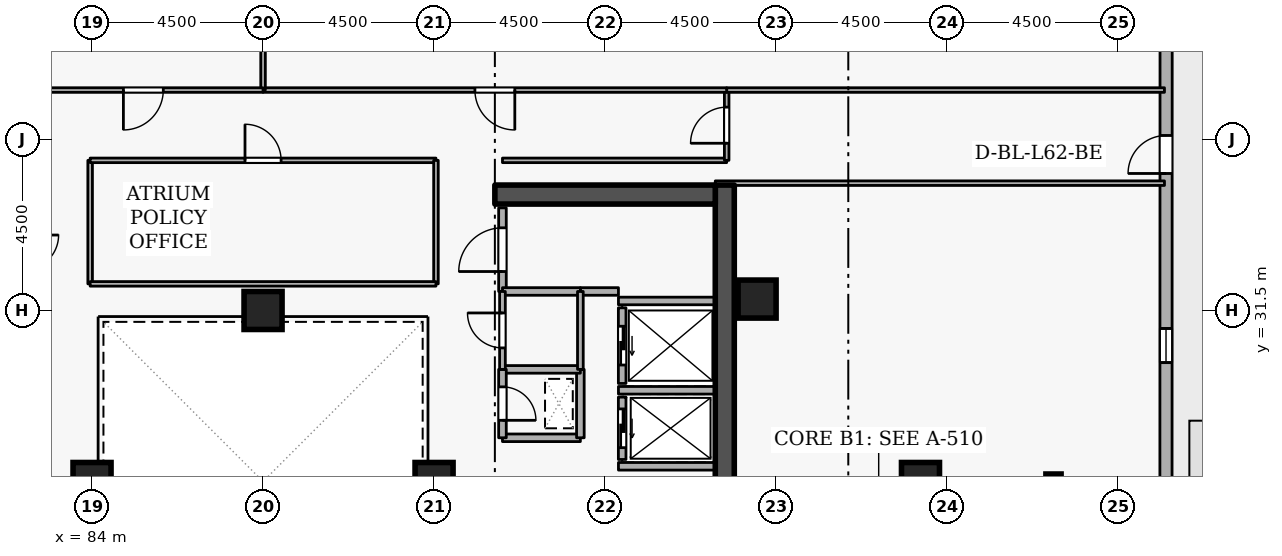
"""IFC4 building model, lengths in metres.
Left out: names, types, materials, properties, quantities, classifications, styles, units other than length and angle.
Written with IfcOpenShell. Run it as: python <this file> out.ifc"""

import sys

from ifc_helpers import new_model, si_unit, direction, frame, frame_2d, origin, origin_2d, place, context, subcontext, project, spatial, rectangle, i_section, extrude, element, fill, save


model = new_model("IFC4")
c1 = context("Model", 3, precision=1e-05, world=origin(), true_north=direction((0.0, 1.0)))
c2 = subcontext(c1, "Body", "Model", "MODEL_VIEW")
j1 = project(units=[si_unit("LENGTHUNIT", "METRE"), si_unit("PLANEANGLEUNIT", "RADIAN")], contexts=[c1])
p1 = place(None, origin())
s1 = spatial("IfcSite", under=j1, at=p1, CompositionType="ELEMENT")
p2 = place(p1, origin())
s2 = spatial("IfcBuilding", under=s1, at=p2, CompositionType="ELEMENT")
p3 = place(p2, frame((0.0, 0.0, 233.1)))
s3 = spatial("IfcBuildingStorey", under=s2, at=p3, CompositionType="ELEMENT", Elevation=233.1)
p4 = place(p3, frame((100.65, 19.2, 0.0), z_axis=(0.0, 0.0, 1.0), x_axis=(0.0, 1.0, 0.0)))
e1 = element("IfcWall", 1, at=p4, inside=s3, PredefinedType="SHEAR", context=c2, shape_type="SweptSolid", body=[
    extrude(rectangle(XDim=15.6, YDim=0.5, at=frame_2d((7.8, 0.0))), origin(), (0.0, 0.0, 1.0), 3.6),
])
p5 = place(p3, frame((94.6, 34.55, 0.0), z_axis=(0.0, 0.0, 1.0), x_axis=(1.0, 0.0, 0.0)))
e2 = element("IfcWall", 2, at=p5, inside=s3, PredefinedType="SHEAR", context=c2, shape_type="SweptSolid", body=[
    extrude(rectangle(XDim=5.8, YDim=0.5, at=frame_2d((2.9, 0.0))), origin(), (0.0, 0.0, 1.0), 3.6),
])
for number, where, z_axis, x_axis in (
    (3, (105.8, 27.0, 0.0), (0.0, 0.0, 1.0), (1.0, 0.0, 0.0)),
    (4, (101.5, 31.8, 0.0), (0.0, 0.0, 1.0), (1.0, 0.0, 0.0)),
    (5, (93.0, 27.0, 0.0), (0.0, 0.0, 1.0), (1.0, 0.0, 0.0)),
    (6, (84.0, 27.0, 0.0), (0.0, 0.0, 1.0), (1.0, 0.0, 0.0)),
    (7, (88.5, 31.5, 0.0), (0.0, 0.0, 1.0), (1.0, 0.0, 0.0)),
):
    element("IfcColumn", number, at=place(p3, frame(where, z_axis=z_axis, x_axis=x_axis)), inside=s3, PredefinedType="COLUMN", context=c2, shape_type="SweptSolid", body=[
        extrude(rectangle(XDim=1.0, YDim=1.0, at=origin_2d()), origin(), (0.0, 0.0, 1.0), 3.6),
    ])
p6 = place(p3, frame((109.3, 27.0, 0.0), z_axis=(0.0, 0.0, 1.0), x_axis=(1.0, 0.0, 0.0)))
e8 = element("IfcColumn", 8, at=p6, inside=s3, PredefinedType="COLUMN", context=c2, shape_type="SweptSolid", body=[
    extrude(i_section(OverallWidth=0.399, OverallDepth=0.394, WebThickness=0.023, FlangeThickness=0.037, FilletRadius=0.015, at=origin_2d()), origin(), (0.0, 0.0, 1.0), 3.6),
])
p7 = place(p3, frame((112.254, 9.128, 0.0), z_axis=(0.0, 0.0, 1.0), x_axis=(0.000332378036, 0.999999944762, 0.0)))
e9 = element("IfcWall", 9, at=p7, inside=s3, PredefinedType="STANDARD", context=c2, shape_type="SweptSolid", body=[
    extrude(rectangle(XDim=33.054, YDim=0.32, at=frame_2d((16.527, 0.0))), origin(), (0.0, 0.0, 1.0), 2.7),
])
p8 = place(p7, frame((25.977, 0.0, 0.0)))
e10 = element("IfcOpeningElement", 10, at=p8, cuts=e9, PredefinedType="OPENING", context=c2, shape_type="SweptSolid", body=[
    extrude(rectangle(XDim=1.0, YDim=2.08, at=frame_2d((0.5, 1.04))), frame((0.0, 0.17, 0.0), z_axis=(0.0, -1.0, 0.0), x_axis=(1.0, 0.0, 0.0)), (0.0, 0.0, 1.0), 0.34),
])
p9 = place(p7, frame((1.8, 0.0, 0.72)))
e11 = element("IfcOpeningElement", 11, at=p9, cuts=e9, PredefinedType="OPENING", context=c2, shape_type="SweptSolid", body=[
    extrude(rectangle(XDim=0.9, YDim=1.75, at=frame_2d((0.45, 0.875))), frame((0.0, 0.17, 0.0), z_axis=(0.0, -1.0, 0.0), x_axis=(1.0, 0.0, 0.0)), (0.0, 0.0, 1.0), 0.34),
])
p10 = place(p7, frame((11.4, 0.0, 0.72)))
e12 = element("IfcOpeningElement", 12, at=p10, cuts=e9, PredefinedType="OPENING", context=c2, shape_type="SweptSolid", body=[
    extrude(rectangle(XDim=0.9, YDim=1.75, at=frame_2d((0.45, 0.875))), frame((0.0, 0.17, 0.0), z_axis=(0.0, -1.0, 0.0), x_axis=(1.0, 0.0, 0.0)), (0.0, 0.0, 1.0), 0.34),
])
p11 = place(p7, frame((16.2, 0.0, 0.72)))
e13 = element("IfcOpeningElement", 13, at=p11, cuts=e9, PredefinedType="OPENING", context=c2, shape_type="SweptSolid", body=[
    extrude(rectangle(XDim=0.9, YDim=1.75, at=frame_2d((0.45, 0.875))), frame((0.0, 0.17, 0.0), z_axis=(0.0, -1.0, 0.0), x_axis=(1.0, 0.0, 0.0)), (0.0, 0.0, 1.0), 0.34),
])
p12 = place(p7, frame((21.0, 0.0, 0.72)))
e14 = element("IfcOpeningElement", 14, at=p12, cuts=e9, PredefinedType="OPENING", context=c2, shape_type="SweptSolid", body=[
    extrude(rectangle(XDim=0.9, YDim=1.75, at=frame_2d((0.45, 0.875))), frame((0.0, 0.17, 0.0), z_axis=(0.0, -1.0, 0.0), x_axis=(1.0, 0.0, 0.0)), (0.0, 0.0, 1.0), 0.34),
])
p13 = place(p3, frame((97.95, 29.22, 0.0), z_axis=(0.0, 0.0, 1.0), x_axis=(0.0, -1.0, 0.0)))
e15 = element("IfcWall", 15, at=p13, inside=s3, PredefinedType="STANDARD", context=c2, shape_type="SweptSolid", body=[
    extrude(rectangle(XDim=1.64, YDim=0.2, at=frame_2d((0.82, 0.0))), origin(), (0.0, 0.0, 1.0), 3.34),
])
p14 = place(p13, frame((0.31, 0.0, 0.0)))
e16 = element("IfcOpeningElement", 16, at=p14, cuts=e15, PredefinedType="OPENING", context=c2, shape_type="SweptSolid", body=[
    extrude(rectangle(XDim=1.02, YDim=2.06, at=frame_2d((0.51, 1.03))), frame((0.0, 0.11, 0.0), z_axis=(0.0, -1.0, 0.0), x_axis=(1.0, 0.0, 0.0)), (0.0, 0.0, 1.0), 0.22),
])
p15 = place(p3, frame((97.95, 31.57, 0.0), z_axis=(0.0, 0.0, 1.0), x_axis=(0.0, -1.0, 0.0)))
e17 = element("IfcWall", 17, at=p15, inside=s3, PredefinedType="STANDARD", context=c2, shape_type="SweptSolid", body=[
    extrude(rectangle(XDim=1.99, YDim=0.2, at=frame_2d((0.995, 0.0))), origin(), (0.0, 0.0, 1.0), 3.34),
])
p16 = place(p15, frame((0.485, 0.0, 0.0)))
e18 = element("IfcOpeningElement", 18, at=p16, cuts=e17, PredefinedType="OPENING", context=c2, shape_type="SweptSolid", body=[
    extrude(rectangle(XDim=1.02, YDim=2.06, at=frame_2d((0.51, 1.03))), frame((0.0, 0.11, 0.0), z_axis=(0.0, -1.0, 0.0), x_axis=(1.0, 0.0, 0.0)), (0.0, 0.0, 1.0), 0.22),
])
for number, where, z_axis, x_axis in (
    (19, (97.852, 29.4, 0.0), (0.0, 0.0, 1.0), (1.0, 0.0, 0.0)),
    (20, (97.852, 27.4, 0.0), (0.0, 0.0, 1.0), (1.0, 0.0, 0.0)),
    (21, (97.852, 31.75, 0.0), (0.0, 0.0, 1.0), (1.0, 0.0, 0.0)),
):
    element("IfcWall", number, at=place(p3, frame(where, z_axis=z_axis, x_axis=x_axis)), inside=s3, PredefinedType="STANDARD", context=c2, shape_type="SweptSolid", body=[
        extrude(rectangle(XDim=2.536, YDim=0.2, at=frame_2d((1.268, 0.0))), origin(), (0.0, 0.0, 1.0), 3.34),
    ])
p17 = place(p3, frame((94.8, 28.15, 0.0), z_axis=(0.0, 0.0, 1.0), x_axis=(1.0, 0.0, 0.0)))
e22 = element("IfcWall", 22, at=p17, inside=s3, PredefinedType="STANDARD", context=c2, shape_type="SweptSolid", body=[
    extrude(rectangle(XDim=2.05, YDim=0.2, at=frame_2d((1.025, 0.0))), origin(), (0.0, 0.0, 1.0), 3.34),
])
p18 = place(p3, frame((96.85, 28.15, 0.0), z_axis=(0.0, 0.0, 1.0), x_axis=(0.0, 1.0, 0.0)))
e23 = element("IfcWall", 23, at=p18, inside=s3, PredefinedType="STANDARD", context=c2, shape_type="SweptSolid", body=[
    extrude(rectangle(XDim=1.8, YDim=0.2, at=frame_2d((0.9, 0.0))), origin(), (0.0, 0.0, 1.0), 3.34),
])
p19 = place(p3, frame((96.85, 29.95, 0.0), z_axis=(0.0, 0.0, 1.0), x_axis=(-1.0, 0.0, 0.0)))
e24 = element("IfcWall", 24, at=p19, inside=s3, PredefinedType="STANDARD", context=c2, shape_type="SweptSolid", body=[
    extrude(rectangle(XDim=2.05, YDim=0.2, at=frame_2d((1.025, 0.0))), origin(), (0.0, 0.0, 1.0), 3.34),
])
p20 = place(p3, frame((94.8, 29.95, 0.0), z_axis=(0.0, 0.0, 1.0), x_axis=(0.0, -1.0, 0.0)))
e25 = element("IfcWall", 25, at=p20, inside=s3, PredefinedType="STANDARD", context=c2, shape_type="SweptSolid", body=[
    extrude(rectangle(XDim=1.8, YDim=0.2, at=frame_2d((0.9, 0.0))), origin(), (0.0, 0.0, 1.0), 3.34),
])
p21 = place(p20, frame((0.46, 0.0, 0.0)))
e26 = element("IfcOpeningElement", 26, at=p21, cuts=e25, PredefinedType="OPENING", context=c2, shape_type="SweptSolid", body=[
    extrude(rectangle(XDim=0.88, YDim=2.04, at=frame_2d((0.44, 1.02))), frame((0.0, 0.11, 0.0), z_axis=(0.0, -1.0, 0.0), x_axis=(1.0, 0.0, 0.0)), (0.0, 0.0, 1.0), 0.22),
])
p22 = place(p3, frame((94.8, 32.0, 0.0), z_axis=(0.0, 0.0, 1.0), x_axis=(0.0, 1.0, 0.0)))
e27 = element("IfcWall", 27, at=p22, inside=s3, PredefinedType="STANDARD", context=c2, shape_type="SweptSolid", body=[
    extrude(rectangle(XDim=2.2, YDim=0.2, at=frame_2d((1.1, 0.0))), origin(), (0.0, 0.0, 1.0), 3.34),
])
p23 = place(p22, frame((0.525, 0.0, 0.0)))
e28 = element("IfcOpeningElement", 28, at=p23, cuts=e27, PredefinedType="OPENING", context=c2, shape_type="SweptSolid", body=[
    extrude(rectangle(XDim=1.15, YDim=2.1, at=frame_2d((0.575, 1.05))), frame((0.0, 0.11, 0.0), z_axis=(0.0, -1.0, 0.0), x_axis=(1.0, 0.0, 0.0)), (0.0, 0.0, 1.0), 0.22),
])
p24 = place(p3, frame((97.852, 32.0, 0.0), z_axis=(0.0, 0.0, 1.0), x_axis=(-1.0, 0.0, 0.0)))
e29 = element("IfcWall", 29, at=p24, inside=s3, PredefinedType="STANDARD", context=c2, shape_type="SweptSolid", body=[
    extrude(rectangle(XDim=1.002, YDim=0.2, at=frame_2d((0.501, 0.0))), origin(), (0.0, 0.0, 1.0), 3.34),
])
p25 = place(p3, frame((96.85, 32.0, 0.0), z_axis=(0.0, 0.0, 1.0), x_axis=(-1.0, 0.0, 0.0)))
e30 = element("IfcWall", 30, at=p25, inside=s3, PredefinedType="STANDARD", context=c2, shape_type="SweptSolid", body=[
    extrude(rectangle(XDim=2.05, YDim=0.2, at=frame_2d((1.025, 0.0))), origin(), (0.0, 0.0, 1.0), 3.34),
])
p26 = place(p3, frame((94.8, 29.95, 0.0), z_axis=(0.0, 0.0, 1.0), x_axis=(0.0, 1.0, 0.0)))
e31 = element("IfcWall", 31, at=p26, inside=s3, PredefinedType="PARTITIONING", context=c2, shape_type="SweptSolid", body=[
    extrude(rectangle(XDim=2.05, YDim=0.15, at=frame_2d((1.025, 0.0))), origin(), (0.0, 0.0, 1.0), 3.34),
])
p27 = place(p26, frame((0.565, 0.0, 0.0)))
e32 = element("IfcOpeningElement", 32, at=p27, cuts=e31, PredefinedType="OPENING", context=c2, shape_type="SweptSolid", body=[
    extrude(rectangle(XDim=0.92, YDim=2.08, at=frame_2d((0.46, 1.04))), frame((0.0, 0.085, 0.0), z_axis=(0.0, -1.0, 0.0), x_axis=(1.0, 0.0, 0.0)), (0.0, 0.0, 1.0), 0.17),
])
p28 = place(p3, frame((96.85, 32.0, 0.0), z_axis=(0.0, 0.0, 1.0), x_axis=(0.0, -1.0, 0.0)))
e33 = element("IfcWall", 33, at=p28, inside=s3, PredefinedType="PARTITIONING", context=c2, shape_type="SweptSolid", body=[
    extrude(rectangle(XDim=2.05, YDim=0.15, at=frame_2d((1.025, 0.0))), origin(), (0.0, 0.0, 1.0), 3.34),
])
p29 = place(p3, frame((94.8, 35.45, 0.0), z_axis=(0.0, 0.0, 1.0), x_axis=(1.0, 0.0, 0.0)))
e34 = element("IfcWall", 34, at=p29, inside=s3, PredefinedType="PARTITIONING", context=c2, shape_type="SweptSolid", body=[
    extrude(rectangle(XDim=5.9, YDim=0.12, at=frame_2d((2.95, 0.0))), origin(), (0.0, 0.0, 1.0), 3.34),
])
p30 = place(p3, frame((100.7, 35.45, 0.0), z_axis=(0.0, 0.0, 1.0), x_axis=(0.0, 1.0, 0.0)))
e35 = element("IfcWall", 35, at=p30, inside=s3, PredefinedType="PARTITIONING", context=c2, shape_type="SweptSolid", body=[
    extrude(rectangle(XDim=1.85, YDim=0.12, at=frame_2d((0.925, 0.0))), origin(), (0.0, 0.0, 1.0), 3.34),
])
p31 = place(p30, frame((0.45, 0.0, 0.0)))
e36 = element("IfcOpeningElement", 36, at=p31, cuts=e35, PredefinedType="OPENING", context=c2, shape_type="SweptSolid", body=[
    extrude(rectangle(XDim=0.95, YDim=2.1, at=frame_2d((0.475, 1.05))), frame((0.0, 0.07, 0.0), z_axis=(0.0, -1.0, 0.0), x_axis=(1.0, 0.0, 0.0)), (0.0, 0.0, 1.0), 0.14),
])
p32 = place(p3, frame((100.7, 37.3, 0.0), z_axis=(0.0, 0.0, 1.0), x_axis=(1.0, 0.0, 0.0)))
e37 = element("IfcWall", 37, at=p32, inside=s3, PredefinedType="PARTITIONING", context=c2, shape_type="SweptSolid", body=[
    extrude(rectangle(XDim=11.52, YDim=0.12, at=frame_2d((5.76, 0.0))), origin(), (0.0, 0.0, 1.0), 3.34),
])
p33 = place(p3, frame((112.22, 34.85, 0.0), z_axis=(0.0, 0.0, 1.0), x_axis=(-1.0, 0.0, 0.0)))
e38 = element("IfcWall", 38, at=p33, inside=s3, PredefinedType="PARTITIONING", context=c2, shape_type="SweptSolid", body=[
    extrude(rectangle(XDim=11.82, YDim=0.12, at=frame_2d((5.91, 0.0))), origin(), (0.0, 0.0, 1.0), 2.545),
])
p34 = place(p3, frame((100.7, 37.3, 0.0), z_axis=(0.0, 0.0, 1.0), x_axis=(-1.0, 0.0, 0.0)))
e39 = element("IfcWall", 39, at=p34, inside=s3, PredefinedType="PARTITIONING", context=c2, shape_type="SweptSolid", body=[
    extrude(rectangle(XDim=12.2, YDim=0.12, at=frame_2d((6.1, 0.0))), origin(), (0.0, 0.0, 1.0), 3.34),
])
p35 = place(p34, frame((5.575, 0.0, 0.0)))
e40 = element("IfcOpeningElement", 40, at=p35, cuts=e39, PredefinedType="OPENING", context=c2, shape_type="SweptSolid", body=[
    extrude(rectangle(XDim=1.05, YDim=2.1, at=frame_2d((0.525, 1.05))), frame((0.0, 0.07, 0.0), z_axis=(0.0, -1.0, 0.0), x_axis=(1.0, 0.0, 0.0)), (0.0, 0.0, 1.0), 0.14),
])
p36 = place(p3, frame((88.5, 37.3, 0.0), z_axis=(0.0, 0.0, 1.0), x_axis=(0.0, 1.0, 0.0)))
e41 = element("IfcWall", 41, at=p36, inside=s3, PredefinedType="PARTITIONING", context=c2, shape_type="SweptSolid", body=[
    extrude(rectangle(XDim=7.42, YDim=0.12, at=frame_2d((3.71, 0.0))), origin(), (0.0, 0.0, 1.0), 2.932),
])
p37 = place(p3, frame((88.5, 37.3, 0.0), z_axis=(0.0, 0.0, 1.0), x_axis=(-1.0, 0.0, 0.0)))
e42 = element("IfcWall", 42, at=p37, inside=s3, PredefinedType="PARTITIONING", context=c2, shape_type="SweptSolid", body=[
    extrude(rectangle(XDim=6.3, YDim=0.12, at=frame_2d((3.15, 0.0))), origin(), (0.0, 0.0, 1.0), 3.34),
])
p38 = place(p37, frame((2.625, 0.0, 0.0)))
e43 = element("IfcOpeningElement", 43, at=p38, cuts=e42, PredefinedType="OPENING", context=c2, shape_type="SweptSolid", body=[
    extrude(rectangle(XDim=1.05, YDim=2.1, at=frame_2d((0.525, 1.05))), frame((0.0, 0.07, 0.0), z_axis=(0.0, -1.0, 0.0), x_axis=(1.0, 0.0, 0.0)), (0.0, 0.0, 1.0), 0.14),
])
p39 = place(p3, frame((83.95, 32.2, 0.0), z_axis=(0.0, 0.0, 1.0), x_axis=(0.0, 1.0, 0.0)))
e44 = element("IfcWall", 44, at=p39, inside=s3, PredefinedType="PARTITIONING", context=c2, shape_type="SweptSolid", body=[
    extrude(rectangle(XDim=3.25, YDim=0.12, at=frame_2d((1.625, 0.0))), origin(), (0.0, 0.0, 1.0), 3.34),
])
p40 = place(p3, frame((83.95, 35.45, 0.0), z_axis=(0.0, 0.0, 1.0), x_axis=(1.0, 0.0, 0.0)))
e45 = element("IfcWall", 45, at=p40, inside=s3, PredefinedType="PARTITIONING", context=c2, shape_type="SweptSolid", body=[
    extrude(rectangle(XDim=9.1, YDim=0.12, at=frame_2d((4.55, 0.0))), origin(), (0.0, 0.0, 1.0), 3.34),
])
p41 = place(p40, frame((4.075, 0.0, 0.0)))
e46 = element("IfcOpeningElement", 46, at=p41, cuts=e45, PredefinedType="OPENING", context=c2, shape_type="SweptSolid", body=[
    extrude(rectangle(XDim=0.95, YDim=2.1, at=frame_2d((0.475, 1.05))), frame((0.0, 0.07, 0.0), z_axis=(0.0, -1.0, 0.0), x_axis=(1.0, 0.0, 0.0)), (0.0, 0.0, 1.0), 0.14),
])
p42 = place(p3, frame((93.05, 35.45, 0.0), z_axis=(0.0, 0.0, 1.0), x_axis=(0.0, -1.0, 0.0)))
e47 = element("IfcWall", 47, at=p42, inside=s3, PredefinedType="PARTITIONING", context=c2, shape_type="SweptSolid", body=[
    extrude(rectangle(XDim=3.25, YDim=0.12, at=frame_2d((1.625, 0.0))), origin(), (0.0, 0.0, 1.0), 3.34),
])
p43 = place(p3, frame((93.05, 32.2, 0.0), z_axis=(0.0, 0.0, 1.0), x_axis=(-1.0, 0.0, 0.0)))
e48 = element("IfcWall", 48, at=p43, inside=s3, PredefinedType="PARTITIONING", context=c2, shape_type="SweptSolid", body=[
    extrude(rectangle(XDim=9.1, YDim=0.12, at=frame_2d((4.55, 0.0))), origin(), (0.0, 0.0, 1.0), 3.34),
])
p44 = place(p8, origin())
e49 = element("IfcDoor", 49, at=p44, inside=s3, OperationType="SINGLE_SWING_LEFT", PredefinedType="DOOR", context=c2, shape_type="SweptSolid", body=[
    extrude(rectangle(XDim=1.0, YDim=2.08, at=frame_2d((0.5, 1.04))), frame((0.0, 0.025, 0.0), z_axis=(0.0, -1.0, 0.0), x_axis=(1.0, 0.0, 0.0)), (0.0, 0.0, 1.0), 0.05),
])
fill(e10, e49)
p45 = place(p12, origin())
e50 = element("IfcWindow", 50, at=p45, inside=s3, PartitioningType="SINGLE_PANEL", PredefinedType="WINDOW", context=c2, shape_type="SweptSolid", body=[
    extrude(rectangle(XDim=0.9, YDim=1.75, at=frame_2d((0.45, 0.875))), frame((0.0, 0.03, 0.0), z_axis=(0.0, -1.0, 0.0), x_axis=(1.0, 0.0, 0.0)), (0.0, 0.0, 1.0), 0.06),
])
fill(e14, e50)
p46 = place(p14, origin())
e51 = element("IfcDoor", 51, at=p46, inside=s3, OperationType="SLIDING_TO_LEFT", PredefinedType="DOOR", context=c2, shape_type="SweptSolid", body=[
    extrude(rectangle(XDim=1.02, YDim=2.06, at=frame_2d((0.51, 1.03))), frame((0.0, 0.025, 0.0), z_axis=(0.0, -1.0, 0.0), x_axis=(1.0, 0.0, 0.0)), (0.0, 0.0, 1.0), 0.05),
])
fill(e16, e51)
p47 = place(p16, origin())
e52 = element("IfcDoor", 52, at=p47, inside=s3, OperationType="SLIDING_TO_LEFT", PredefinedType="DOOR", context=c2, shape_type="SweptSolid", body=[
    extrude(rectangle(XDim=1.02, YDim=2.06, at=frame_2d((0.51, 1.03))), frame((0.0, 0.025, 0.0), z_axis=(0.0, -1.0, 0.0), x_axis=(1.0, 0.0, 0.0)), (0.0, 0.0, 1.0), 0.05),
])
fill(e18, e52)
p48 = place(p21, origin())
e53 = element("IfcDoor", 53, at=p48, inside=s3, OperationType="SINGLE_SWING_RIGHT", PredefinedType="DOOR", context=c2, shape_type="SweptSolid", body=[
    extrude(rectangle(XDim=0.88, YDim=2.04, at=frame_2d((0.44, 1.02))), frame((0.0, 0.025, 0.0), z_axis=(0.0, -1.0, 0.0), x_axis=(1.0, 0.0, 0.0)), (0.0, 0.0, 1.0), 0.05),
])
fill(e26, e53)
p49 = place(p27, origin())
e54 = element("IfcDoor", 54, at=p49, inside=s3, OperationType="SINGLE_SWING_RIGHT", PredefinedType="DOOR", context=c2, shape_type="SweptSolid", body=[
    extrude(rectangle(XDim=0.92, YDim=2.08, at=frame_2d((0.46, 1.04))), frame((0.0, 0.025, 0.0), z_axis=(0.0, -1.0, 0.0), x_axis=(1.0, 0.0, 0.0)), (0.0, 0.0, 1.0), 0.05),
])
fill(e32, e54)
p50 = place(p23, origin())
e55 = element("IfcDoor", 55, at=p50, inside=s3, OperationType="SINGLE_SWING_LEFT", PredefinedType="DOOR", context=c2, shape_type="SweptSolid", body=[
    extrude(rectangle(XDim=1.15, YDim=2.1, at=frame_2d((0.575, 1.05))), frame((0.0, 0.025, 0.0), z_axis=(0.0, -1.0, 0.0), x_axis=(1.0, 0.0, 0.0)), (0.0, 0.0, 1.0), 0.05),
])
fill(e28, e55)
p51 = place(p31, origin())
e56 = element("IfcDoor", 56, at=p51, inside=s3, OperationType="SINGLE_SWING_LEFT", PredefinedType="DOOR", context=c2, shape_type="SweptSolid", body=[
    extrude(rectangle(XDim=0.95, YDim=2.1, at=frame_2d((0.475, 1.05))), frame((0.0, 0.025, 0.0), z_axis=(0.0, -1.0, 0.0), x_axis=(1.0, 0.0, 0.0)), (0.0, 0.0, 1.0), 0.05),
])
fill(e36, e56)
p52 = place(p35, origin())
e57 = element("IfcDoor", 57, at=p52, inside=s3, OperationType="SINGLE_SWING_LEFT", PredefinedType="DOOR", context=c2, shape_type="SweptSolid", body=[
    extrude(rectangle(XDim=1.05, YDim=2.1, at=frame_2d((0.525, 1.05))), frame((0.0, 0.025, 0.0), z_axis=(0.0, -1.0, 0.0), x_axis=(1.0, 0.0, 0.0)), (0.0, 0.0, 1.0), 0.05),
])
fill(e40, e57)
p53 = place(p38, origin())
e58 = element("IfcDoor", 58, at=p53, inside=s3, OperationType="SINGLE_SWING_RIGHT", PredefinedType="DOOR", context=c2, shape_type="SweptSolid", body=[
    extrude(rectangle(XDim=1.05, YDim=2.1, at=frame_2d((0.525, 1.05))), frame((0.0, 0.025, 0.0), z_axis=(0.0, -1.0, 0.0), x_axis=(1.0, 0.0, 0.0)), (0.0, 0.0, 1.0), 0.05),
])
fill(e43, e58)
p54 = place(p41, origin())
e59 = element("IfcDoor", 59, at=p54, inside=s3, OperationType="SINGLE_SWING_LEFT", PredefinedType="DOOR", context=c2, shape_type="SweptSolid", body=[
    extrude(rectangle(XDim=0.95, YDim=2.1, at=frame_2d((0.475, 1.05))), frame((0.0, 0.025, 0.0), z_axis=(0.0, -1.0, 0.0), x_axis=(1.0, 0.0, 0.0)), (0.0, 0.0, 1.0), 0.05),
])
fill(e46, e59)
save(model, sys.argv[1])
